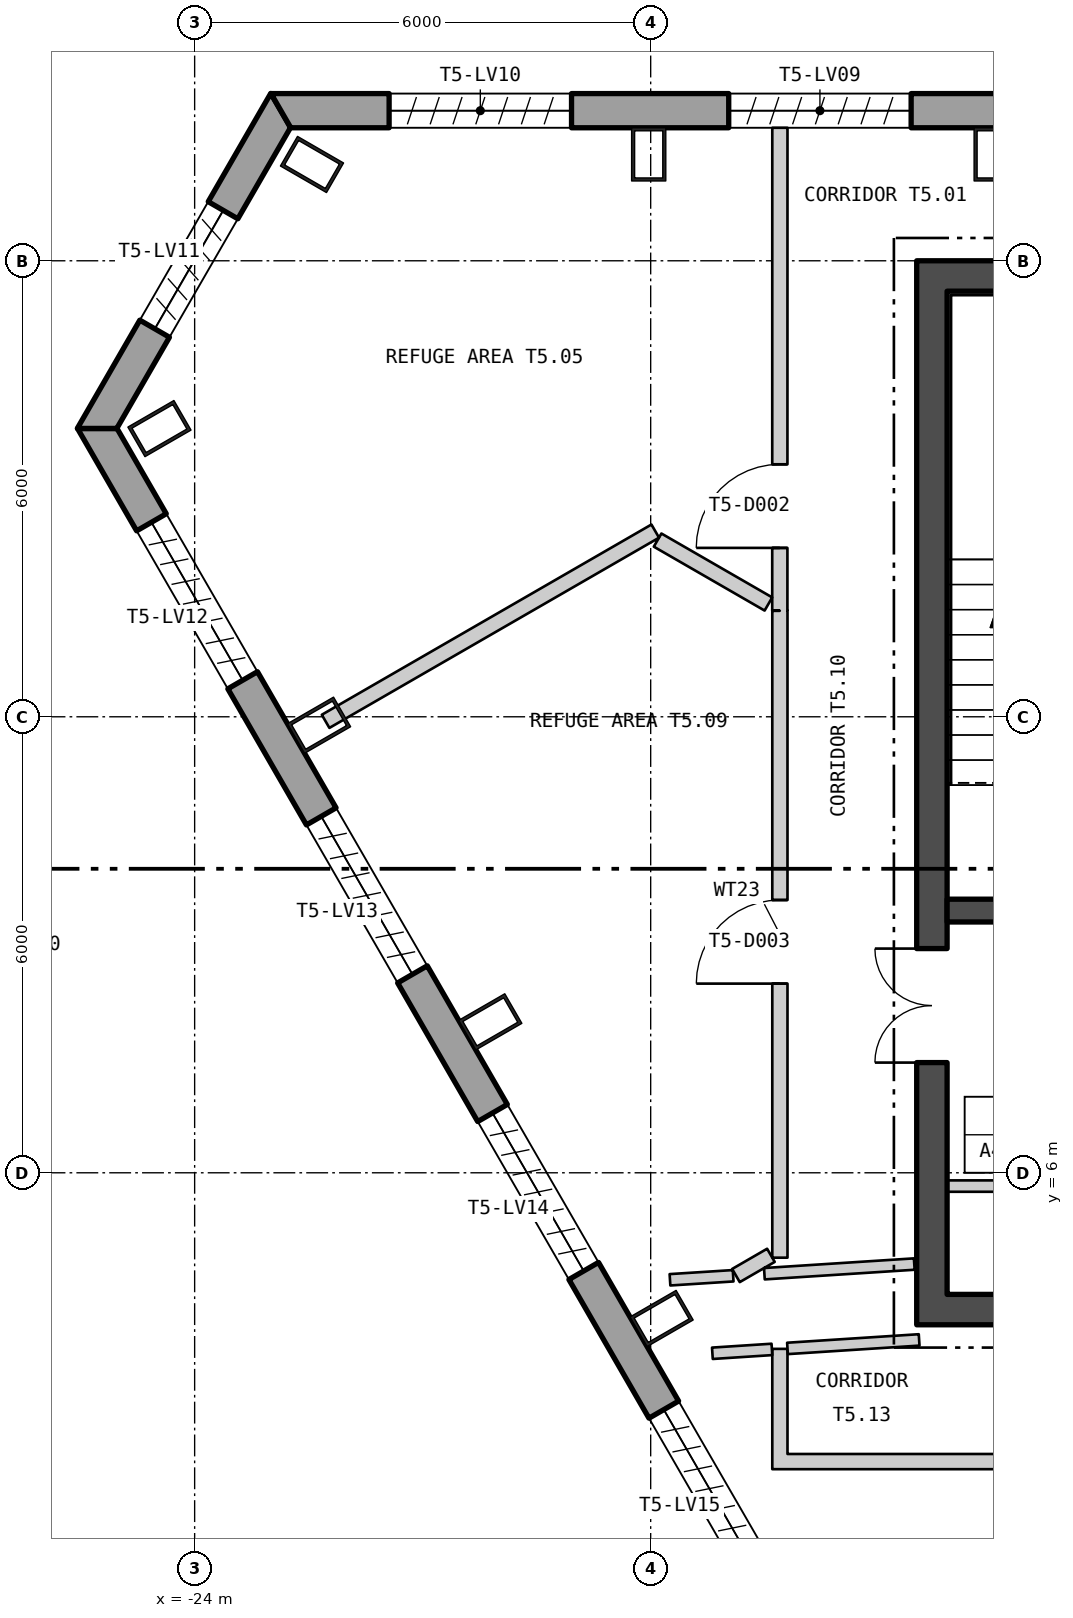
"""IFC4 building model, lengths in metres.
Left out: names, types, materials, properties, quantities, classifications, styles, units other than length and angle.
Written with IfcOpenShell. Run it as: python <this file> out.ifc"""

import sys

from ifc_helpers import new_model, si_unit, direction, frame, frame_2d, origin, origin_2d, place, context, subcontext, project, spatial, polyline, rectangle, hollow_rectangle, outline, extrude, element, fill, save


model = new_model("IFC4")
c1 = context("Model", 3, precision=1e-05, world=origin(), true_north=direction((0.0, 1.0)))
c2 = subcontext(c1, "Body", "Model", "MODEL_VIEW")
j1 = project(units=[si_unit("LENGTHUNIT", "METRE"), si_unit("PLANEANGLEUNIT", "RADIAN")], contexts=[c1])
p1 = place(None, origin())
s1 = spatial("IfcSite", under=j1, at=p1, CompositionType="ELEMENT")
p2 = place(p1, origin())
s2 = spatial("IfcBuilding", under=s1, at=p2, CompositionType="ELEMENT")
p3 = place(p2, frame((0.0, 0.0, 292.2)))
s3 = spatial("IfcBuildingStorey", under=s2, at=p3, CompositionType="ELEMENT", Elevation=292.2)
for number, where, z_axis, x_axis in (
    (1, (-13.52, 19.4, 0.0), (0.0, 0.0, 1.0), (-1.0, 0.0, 0.0)),
    (2, (-18.026, 19.4, 0.0), (0.0, 0.0, 1.0), (-1.0, 0.0, 0.0)),
    (3, (-22.456, 19.267, 0.0), (0.0, 0.0, 1.0), (-0.5, -0.866, 0.0)),
    (4, (-24.463, 15.792, 0.0), (0.0, 0.0, 1.0), (0.5, -0.866, 0.0)),
    (5, (-22.363, 11.889, 0.0), (0.0, 0.0, 1.0), (0.5, -0.866, 0.0)),
    (6, (-20.11, 7.986, 0.0), (0.0, 0.0, 1.0), (0.5, -0.866, 0.0)),
    (7, (-17.856, 4.083, 0.0), (0.0, 0.0, 1.0), (0.5, -0.866, 0.0)),
):
    element("IfcColumn", number, at=place(p3, frame(where, z_axis=z_axis, x_axis=x_axis)), inside=s3, PredefinedType="COLUMN", context=c2, shape_type="SweptSolid", body=[
        extrude(hollow_rectangle(XDim=0.45, YDim=0.7, WallThickness=0.04, at=origin_2d()), origin(), (0.0, 0.0, 1.0), 6.0),
    ])
p4 = place(p3, frame((22.865, 19.975, -0.4), z_axis=(0.0, 0.0, 1.0), x_axis=(-1.0, 0.0, 0.0)))
e8 = element("IfcWall", 8, at=p4, inside=s3, PredefinedType="SOLIDWALL", context=c2, shape_type="SweptSolid", body=[
    extrude(outline(polyline([(-0.13, -0.225), (45.86, -0.225), (45.6, 0.225), (0.13, 0.225), (-0.13, -0.225)])), origin(), (0.0, 0.0, 1.0), 6.0),
])
p5 = place(p4, frame((1.424, 0.0, 1.6)))
e9 = element("IfcOpeningElement", 9, at=p5, cuts=e8, PredefinedType="OPENING", context=c2, shape_type="SweptSolid", body=[
    extrude(rectangle(XDim=2.4, YDim=3.6, at=frame_2d((1.2, 1.8))), frame((0.0, 0.235, 0.0), z_axis=(0.0, -1.0, 0.0), x_axis=(1.0, 0.0, 0.0)), (0.0, 0.0, 1.0), 0.47),
])
p6 = place(p4, frame((5.892, 0.0, 1.6)))
e10 = element("IfcOpeningElement", 10, at=p6, cuts=e8, PredefinedType="OPENING", context=c2, shape_type="SweptSolid", body=[
    extrude(rectangle(XDim=2.4, YDim=3.6, at=frame_2d((1.2, 1.8))), frame((0.0, 0.235, 0.0), z_axis=(0.0, -1.0, 0.0), x_axis=(1.0, 0.0, 0.0)), (0.0, 0.0, 1.0), 0.47),
])
p7 = place(p4, frame((10.399, 0.0, 1.6)))
e11 = element("IfcOpeningElement", 11, at=p7, cuts=e8, PredefinedType="OPENING", context=c2, shape_type="SweptSolid", body=[
    extrude(rectangle(XDim=2.4, YDim=3.6, at=frame_2d((1.2, 1.8))), frame((0.0, 0.235, 0.0), z_axis=(0.0, -1.0, 0.0), x_axis=(1.0, 0.0, 0.0)), (0.0, 0.0, 1.0), 0.47),
])
p8 = place(p4, frame((14.905, 0.0, 1.6)))
e12 = element("IfcOpeningElement", 12, at=p8, cuts=e8, PredefinedType="OPENING", context=c2, shape_type="SweptSolid", body=[
    extrude(rectangle(XDim=2.4, YDim=3.6, at=frame_2d((1.2, 1.8))), frame((0.0, 0.235, 0.0), z_axis=(0.0, -1.0, 0.0), x_axis=(1.0, 0.0, 0.0)), (0.0, 0.0, 1.0), 0.47),
])
p9 = place(p4, frame((19.412, 0.0, 1.6)))
e13 = element("IfcOpeningElement", 13, at=p9, cuts=e8, PredefinedType="OPENING", context=c2, shape_type="SweptSolid", body=[
    extrude(rectangle(XDim=2.4, YDim=3.6, at=frame_2d((1.2, 1.8))), frame((0.0, 0.235, 0.0), z_axis=(0.0, -1.0, 0.0), x_axis=(1.0, 0.0, 0.0)), (0.0, 0.0, 1.0), 0.47),
])
p10 = place(p4, frame((23.918, 0.0, 1.6)))
e14 = element("IfcOpeningElement", 14, at=p10, cuts=e8, PredefinedType="OPENING", context=c2, shape_type="SweptSolid", body=[
    extrude(rectangle(XDim=2.4, YDim=3.6, at=frame_2d((1.2, 1.8))), frame((0.0, 0.235, 0.0), z_axis=(0.0, -1.0, 0.0), x_axis=(1.0, 0.0, 0.0)), (0.0, 0.0, 1.0), 0.47),
])
p11 = place(p4, frame((28.425, 0.0, 1.6)))
e15 = element("IfcOpeningElement", 15, at=p11, cuts=e8, PredefinedType="OPENING", context=c2, shape_type="SweptSolid", body=[
    extrude(rectangle(XDim=2.4, YDim=3.6, at=frame_2d((1.2, 1.8))), frame((0.0, 0.235, 0.0), z_axis=(0.0, -1.0, 0.0), x_axis=(1.0, 0.0, 0.0)), (0.0, 0.0, 1.0), 0.47),
])
p12 = place(p4, frame((32.932, 0.0, 1.6)))
e16 = element("IfcOpeningElement", 16, at=p12, cuts=e8, PredefinedType="OPENING", context=c2, shape_type="SweptSolid", body=[
    extrude(rectangle(XDim=2.4, YDim=3.6, at=frame_2d((1.2, 1.8))), frame((0.0, 0.235, 0.0), z_axis=(0.0, -1.0, 0.0), x_axis=(1.0, 0.0, 0.0)), (0.0, 0.0, 1.0), 0.47),
])
p13 = place(p4, frame((37.438, 0.0, 1.6)))
e17 = element("IfcOpeningElement", 17, at=p13, cuts=e8, PredefinedType="OPENING", context=c2, shape_type="SweptSolid", body=[
    extrude(rectangle(XDim=2.4, YDim=3.6, at=frame_2d((1.2, 1.8))), frame((0.0, 0.235, 0.0), z_axis=(0.0, -1.0, 0.0), x_axis=(1.0, 0.0, 0.0)), (0.0, 0.0, 1.0), 0.47),
])
p14 = place(p4, frame((41.907, 0.0, 1.6)))
e18 = element("IfcOpeningElement", 18, at=p14, cuts=e8, PredefinedType="OPENING", context=c2, shape_type="SweptSolid", body=[
    extrude(rectangle(XDim=2.4, YDim=3.6, at=frame_2d((1.2, 1.8))), frame((0.0, 0.235, 0.0), z_axis=(0.0, -1.0, 0.0), x_axis=(1.0, 0.0, 0.0)), (0.0, 0.0, 1.0), 0.47),
])
p15 = place(p3, frame((-22.869, 19.977, -0.4), z_axis=(0.0, 0.0, 1.0), x_axis=(-0.499997839997, -0.866026650859, 0.0)))
e19 = element("IfcWall", 19, at=p15, inside=s3, PredefinedType="SOLIDWALL", context=c2, shape_type="SweptSolid", body=[
    extrude(outline(polyline([(-0.13, -0.225), (4.96, -0.225), (4.7, 0.225), (0.13, 0.225), (-0.13, -0.225)])), origin(), (0.0, 0.0, 1.0), 6.0),
])
p16 = place(p15, frame((1.515, 0.0, 1.6)))
e20 = element("IfcOpeningElement", 20, at=p16, cuts=e19, PredefinedType="OPENING", context=c2, shape_type="SweptSolid", body=[
    extrude(rectangle(XDim=1.8, YDim=3.6, at=frame_2d((0.9, 1.8))), frame((0.0, 0.235, 0.0), z_axis=(0.0, -1.0, 0.0), x_axis=(1.0, 0.0, 0.0)), (0.0, 0.0, 1.0), 0.47),
])
p17 = place(p3, frame((-25.28, 15.792, -0.18), z_axis=(0.0, 0.0, 1.0), x_axis=(0.500000141277, -0.866025322218, 0.0)))
e21 = element("IfcWall", 21, at=p17, inside=s3, PredefinedType="SOLIDWALL", context=c2, shape_type="SweptSolid", body=[
    extrude(outline(polyline([(-0.13, -0.225), (45.86, -0.225), (45.6, 0.225), (0.13, 0.225), (-0.13, -0.225)])), origin(), (0.0, 0.0, 1.0), 5.9),
])
p18 = place(p17, frame((1.424, 0.0, 1.38)))
e22 = element("IfcOpeningElement", 22, at=p18, cuts=e21, PredefinedType="OPENING", context=c2, shape_type="SweptSolid", body=[
    extrude(rectangle(XDim=2.4, YDim=3.6, at=frame_2d((1.2, 1.8))), frame((0.0, 0.235, 0.0), z_axis=(0.0, -1.0, 0.0), x_axis=(1.0, 0.0, 0.0)), (0.0, 0.0, 1.0), 0.47),
])
p19 = place(p17, frame((5.892, 0.0, 1.38)))
e23 = element("IfcOpeningElement", 23, at=p19, cuts=e21, PredefinedType="OPENING", context=c2, shape_type="SweptSolid", body=[
    extrude(rectangle(XDim=2.4, YDim=3.6, at=frame_2d((1.2, 1.8))), frame((0.0, 0.235, 0.0), z_axis=(0.0, -1.0, 0.0), x_axis=(1.0, 0.0, 0.0)), (0.0, 0.0, 1.0), 0.47),
])
p20 = place(p17, frame((10.399, 0.0, 1.38)))
e24 = element("IfcOpeningElement", 24, at=p20, cuts=e21, PredefinedType="OPENING", context=c2, shape_type="SweptSolid", body=[
    extrude(rectangle(XDim=2.4, YDim=3.6, at=frame_2d((1.2, 1.8))), frame((0.0, 0.235, 0.0), z_axis=(0.0, -1.0, 0.0), x_axis=(1.0, 0.0, 0.0)), (0.0, 0.0, 1.0), 0.47),
])
p21 = place(p17, frame((14.905, 0.0, 1.38)))
e25 = element("IfcOpeningElement", 25, at=p21, cuts=e21, PredefinedType="OPENING", context=c2, shape_type="SweptSolid", body=[
    extrude(rectangle(XDim=2.4, YDim=3.6, at=frame_2d((1.2, 1.8))), frame((0.0, 0.235, 0.0), z_axis=(0.0, -1.0, 0.0), x_axis=(1.0, 0.0, 0.0)), (0.0, 0.0, 1.0), 0.47),
])
p22 = place(p17, frame((19.412, 0.0, 1.38)))
e26 = element("IfcOpeningElement", 26, at=p22, cuts=e21, PredefinedType="OPENING", context=c2, shape_type="SweptSolid", body=[
    extrude(rectangle(XDim=2.4, YDim=3.6, at=frame_2d((1.2, 1.8))), frame((0.0, 0.235, 0.0), z_axis=(0.0, -1.0, 0.0), x_axis=(1.0, 0.0, 0.0)), (0.0, 0.0, 1.0), 0.47),
])
p23 = place(p17, frame((23.918, 0.0, 1.38)))
e27 = element("IfcOpeningElement", 27, at=p23, cuts=e21, PredefinedType="OPENING", context=c2, shape_type="SweptSolid", body=[
    extrude(rectangle(XDim=2.4, YDim=3.6, at=frame_2d((1.2, 1.8))), frame((0.0, 0.235, 0.0), z_axis=(0.0, -1.0, 0.0), x_axis=(1.0, 0.0, 0.0)), (0.0, 0.0, 1.0), 0.47),
])
p24 = place(p17, frame((28.425, 0.0, 1.38)))
e28 = element("IfcOpeningElement", 28, at=p24, cuts=e21, PredefinedType="OPENING", context=c2, shape_type="SweptSolid", body=[
    extrude(rectangle(XDim=2.4, YDim=3.6, at=frame_2d((1.2, 1.8))), frame((0.0, 0.235, 0.0), z_axis=(0.0, -1.0, 0.0), x_axis=(1.0, 0.0, 0.0)), (0.0, 0.0, 1.0), 0.47),
])
p25 = place(p17, frame((32.932, 0.0, 1.38)))
e29 = element("IfcOpeningElement", 29, at=p25, cuts=e21, PredefinedType="OPENING", context=c2, shape_type="SweptSolid", body=[
    extrude(rectangle(XDim=2.4, YDim=3.6, at=frame_2d((1.2, 1.8))), frame((0.0, 0.235, 0.0), z_axis=(0.0, -1.0, 0.0), x_axis=(1.0, 0.0, 0.0)), (0.0, 0.0, 1.0), 0.47),
])
p26 = place(p17, frame((37.438, 0.0, 1.38)))
e30 = element("IfcOpeningElement", 30, at=p26, cuts=e21, PredefinedType="OPENING", context=c2, shape_type="SweptSolid", body=[
    extrude(rectangle(XDim=2.4, YDim=3.6, at=frame_2d((1.2, 1.8))), frame((0.0, 0.235, 0.0), z_axis=(0.0, -1.0, 0.0), x_axis=(1.0, 0.0, 0.0)), (0.0, 0.0, 1.0), 0.47),
])
p27 = place(p17, frame((41.907, 0.0, 1.38)))
e31 = element("IfcOpeningElement", 31, at=p27, cuts=e21, PredefinedType="OPENING", context=c2, shape_type="SweptSolid", body=[
    extrude(rectangle(XDim=2.4, YDim=3.6, at=frame_2d((1.2, 1.8))), frame((0.0, 0.235, 0.0), z_axis=(0.0, -1.0, 0.0), x_axis=(1.0, 0.0, 0.0)), (0.0, 0.0, 1.0), 0.47),
])
p28 = place(p3, frame((-14.5, 4.2, 0.0), z_axis=(0.0, 0.0, 1.0), x_axis=(1.0, 0.0, 0.0)))
e32 = element("IfcWall", 32, at=p28, inside=s3, PredefinedType="SHEAR", context=c2, shape_type="SweptSolid", body=[
    extrude(rectangle(XDim=29.0, YDim=0.4, at=frame_2d((14.5, 0.0))), origin(), (0.0, 0.0, 1.0), 5.7),
])
p29 = place(p28, frame((9.0, 0.0, 0.0)))
e33 = element("IfcOpeningElement", 33, at=p29, cuts=e32, PredefinedType="OPENING", context=c2, shape_type="SweptSolid", body=[
    extrude(rectangle(XDim=1.8, YDim=2.4, at=frame_2d((0.9, 1.2))), frame((0.0, 0.21, 0.0), z_axis=(0.0, -1.0, 0.0), x_axis=(1.0, 0.0, 0.0)), (0.0, 0.0, 1.0), 0.42),
])
p30 = place(p28, frame((19.0, 0.0, 0.0)))
e34 = element("IfcOpeningElement", 34, at=p30, cuts=e32, PredefinedType="OPENING", context=c2, shape_type="SweptSolid", body=[
    extrude(rectangle(XDim=1.8, YDim=2.4, at=frame_2d((0.9, 1.2))), frame((0.0, 0.21, 0.0), z_axis=(0.0, -1.0, 0.0), x_axis=(1.0, 0.0, 0.0)), (0.0, 0.0, 1.0), 0.42),
])
p31 = place(p3, frame((-14.5, 17.8, 0.0), z_axis=(0.0, 0.0, 1.0), x_axis=(1.0, 0.0, 0.0)))
e35 = element("IfcWall", 35, at=p31, inside=s3, PredefinedType="SHEAR", context=c2, shape_type="SweptSolid", body=[
    extrude(rectangle(XDim=29.0, YDim=0.4, at=frame_2d((14.5, 0.0))), origin(), (0.0, 0.0, 1.0), 5.7),
])
p32 = place(p3, frame((-14.3, 4.4, 0.0), z_axis=(0.0, 0.0, 1.0), x_axis=(0.0, 1.0, 0.0)))
e36 = element("IfcWall", 36, at=p32, inside=s3, PredefinedType="SHEAR", context=c2, shape_type="SweptSolid", body=[
    extrude(rectangle(XDim=13.2, YDim=0.4, at=frame_2d((6.6, 0.0))), origin(), (0.0, 0.0, 1.0), 5.7),
])
p33 = place(p32, frame((3.05, 0.0, 0.0)))
e37 = element("IfcOpeningElement", 37, at=p33, cuts=e36, PredefinedType="OPENING", context=c2, shape_type="SweptSolid", body=[
    extrude(rectangle(XDim=1.5, YDim=2.1, at=frame_2d((0.75, 1.05))), frame((0.0, 0.21, 0.0), z_axis=(0.0, -1.0, 0.0), x_axis=(1.0, 0.0, 0.0)), (0.0, 0.0, 1.0), 0.42),
])
p34 = place(p3, frame((-14.1, 9.45, 0.0), z_axis=(0.0, 0.0, 1.0), x_axis=(1.0, 0.0, 0.0)))
e38 = element("IfcWall", 38, at=p34, inside=s3, PredefinedType="SHEAR", context=c2, shape_type="SweptSolid", body=[
    extrude(rectangle(XDim=3.1, YDim=0.3, at=frame_2d((1.55, 0.0))), origin(), (0.0, 0.0, 1.0), 5.7),
])
p35 = place(p34, frame((0.95, 0.0, 0.0)))
e39 = element("IfcOpeningElement", 39, at=p35, cuts=e38, PredefinedType="OPENING", context=c2, shape_type="SweptSolid", body=[
    extrude(rectangle(XDim=1.2, YDim=2.1, at=frame_2d((0.6, 1.05))), frame((0.0, 0.16, 0.0), z_axis=(0.0, -1.0, 0.0), x_axis=(1.0, 0.0, 0.0)), (0.0, 0.0, 1.0), 0.32),
])
p36 = place(p3, frame((-14.1, 5.825, 0.0), z_axis=(0.0, 0.0, 1.0), x_axis=(1.0, 0.0, 0.0)))
e40 = element("IfcWall", 40, at=p36, inside=s3, PredefinedType="PARTITIONING", context=c2, shape_type="SweptSolid", body=[
    extrude(rectangle(XDim=3.1, YDim=0.15, at=frame_2d((1.55, 0.0))), origin(), (0.0, 0.0, 1.0), 5.7),
])
p37 = place(p3, frame((-22.277, 11.94, 0.0), z_axis=(0.0, 0.0, 1.0), x_axis=(0.866109108303, 0.499854991488, 0.0)))
e41 = element("IfcWall", 41, at=p37, inside=s3, PredefinedType="PARTITIONING", context=c2, shape_type="SweptSolid", body=[
    extrude(rectangle(XDim=5.008, YDim=0.2, at=frame_2d((2.504, 0.0))), origin(), (0.0, 0.0, 1.0), 5.7),
])
p38 = place(p3, frame((-17.909, 14.325, 0.0), z_axis=(0.0, 0.0, 1.0), x_axis=(0.866225147291, -0.499653874398, 0.0)))
e42 = element("IfcWall", 42, at=p38, inside=s3, PredefinedType="PARTITIONING", context=c2, shape_type="SweptSolid", body=[
    extrude(rectangle(XDim=1.683, YDim=0.2, at=frame_2d((0.842, 0.0))), origin(), (0.0, 0.0, 1.0), 5.7),
])
p39 = place(p3, frame((-17.746, 4.592, 0.0), z_axis=(0.0, 0.0, 1.0), x_axis=(0.997972330248, 0.063649258127, 0.0)))
e43 = element("IfcWall", 43, at=p39, inside=s3, PredefinedType="PARTITIONING", context=c2, shape_type="SweptSolid", body=[
    extrude(rectangle(XDim=0.833, YDim=0.15, at=frame_2d((0.416, 0.0))), origin(), (0.0, 0.0, 1.0), 5.7),
])
p40 = place(p3, frame((-17.188, 3.625, 0.0), z_axis=(0.0, 0.0, 1.0), x_axis=(0.997885500156, 0.064996373573, 0.0)))
e44 = element("IfcWall", 44, at=p40, inside=s3, PredefinedType="PARTITIONING", context=c2, shape_type="SweptSolid", body=[
    extrude(rectangle(XDim=0.785, YDim=0.15, at=frame_2d((0.392, 0.0))), origin(), (0.0, 0.0, 1.0), 5.7),
])
p41 = place(p3, frame((-16.878, 4.648, 0.0), z_axis=(0.0, 0.0, 1.0), x_axis=(0.865683861507, 0.500591102524, 0.0)))
e45 = element("IfcWall", 45, at=p41, inside=s3, PredefinedType="PARTITIONING", context=c2, shape_type="SweptSolid", body=[
    extrude(rectangle(XDim=0.531, YDim=0.2, at=frame_2d((0.266, 0.0))), origin(), (0.0, 0.0, 1.0), 5.7),
])
p42 = place(p3, frame((-16.504, 4.672, 0.0), z_axis=(0.0, 0.0, 1.0), x_axis=(0.997932644153, 0.064268481647, 0.0)))
e46 = element("IfcWall", 46, at=p42, inside=s3, PredefinedType="PARTITIONING", context=c2, shape_type="SweptSolid", body=[
    extrude(rectangle(XDim=1.976, YDim=0.15, at=frame_2d((0.988, 0.0))), origin(), (0.0, 0.0, 1.0), 5.7),
])
p43 = place(p3, frame((-16.4, 2.2, 0.0), z_axis=(0.0, 0.0, 1.0), x_axis=(1.0, 0.0, 0.0)))
e47 = element("IfcWall", 47, at=p43, inside=s3, PredefinedType="PARTITIONING", context=c2, shape_type="SweptSolid", body=[
    extrude(rectangle(XDim=8.73, YDim=0.2, at=frame_2d((4.365, 0.0))), origin(), (0.0, 0.0, 1.0), 5.7),
])
p44 = place(p43, frame((4.657, 0.0, 0.0)))
e48 = element("IfcOpeningElement", 48, at=p44, cuts=e47, PredefinedType="OPENING", context=c2, shape_type="SweptSolid", body=[
    extrude(rectangle(XDim=1.1, YDim=2.1, at=frame_2d((0.55, 1.05))), frame((0.0, 0.11, 0.0), z_axis=(0.0, -1.0, 0.0), x_axis=(1.0, 0.0, 0.0)), (0.0, 0.0, 1.0), 0.22),
])
p45 = place(p3, frame((-16.301, 13.395, 0.0), z_axis=(0.0, 0.0, 1.0), x_axis=(0.00015735641, 0.999999987619, 0.0)))
e49 = element("IfcWall", 49, at=p45, inside=s3, PredefinedType="PARTITIONING", context=c2, shape_type="SweptSolid", body=[
    extrude(rectangle(XDim=6.355, YDim=0.2, at=frame_2d((3.178, 0.0))), origin(), (0.0, 0.0, 1.0), 5.7),
])
p46 = place(p45, frame((0.827, 0.0, 0.0)))
e50 = element("IfcOpeningElement", 50, at=p46, cuts=e49, PredefinedType="OPENING", context=c2, shape_type="SweptSolid", body=[
    extrude(rectangle(XDim=1.1, YDim=2.1, at=frame_2d((0.55, 1.05))), frame((0.0, 0.11, 0.0), z_axis=(0.0, -1.0, 0.0), x_axis=(1.0, 0.0, 0.0)), (0.0, 0.0, 1.0), 0.22),
])
p47 = place(p3, frame((-16.3, 2.3, 0.0), z_axis=(0.0, 0.0, 1.0), x_axis=(0.0, 1.0, 0.0)))
e51 = element("IfcWall", 51, at=p47, inside=s3, PredefinedType="PARTITIONING", context=c2, shape_type="SweptSolid", body=[
    extrude(rectangle(XDim=1.383, YDim=0.2, at=frame_2d((0.692, 0.0))), origin(), (0.0, 0.0, 1.0), 5.7),
])
p48 = place(p3, frame((-16.3, 4.883, 0.0), z_axis=(0.0, 0.0, 1.0), x_axis=(0.0, 1.0, 0.0)))
e52 = element("IfcWall", 52, at=p48, inside=s3, PredefinedType="PARTITIONING", context=c2, shape_type="SweptSolid", body=[
    extrude(rectangle(XDim=8.512, YDim=0.2, at=frame_2d((4.256, 0.0))), origin(), (0.0, 0.0, 1.0), 5.7),
])
p49 = place(p48, frame((3.606, 0.0, 0.0)))
e53 = element("IfcOpeningElement", 53, at=p49, cuts=e52, PredefinedType="OPENING", context=c2, shape_type="SweptSolid", body=[
    extrude(rectangle(XDim=1.1, YDim=2.1, at=frame_2d((0.55, 1.05))), frame((0.0, 0.11, 0.0), z_axis=(0.0, -1.0, 0.0), x_axis=(1.0, 0.0, 0.0)), (0.0, 0.0, 1.0), 0.22),
])
p50 = place(p3, frame((-16.2, 3.689, 0.0), z_axis=(0.0, 0.0, 1.0), x_axis=(0.997915745008, 0.064530348407, 0.0)))
e54 = element("IfcWall", 54, at=p50, inside=s3, PredefinedType="PARTITIONING", context=c2, shape_type="SweptSolid", body=[
    extrude(rectangle(XDim=1.736, YDim=0.15, at=frame_2d((0.868, 0.0))), origin(), (0.0, 0.0, 1.0), 5.7),
])
p51 = place(p33, origin())
e55 = element("IfcDoor", 55, at=p51, inside=s3, OperationType="DOUBLE_DOOR_SINGLE_SWING", PredefinedType="DOOR", context=c2, shape_type="SweptSolid", body=[
    extrude(rectangle(XDim=1.5, YDim=2.1, at=frame_2d((0.75, 1.05))), frame((0.0, 0.025, 0.0), z_axis=(0.0, -1.0, 0.0), x_axis=(1.0, 0.0, 0.0)), (0.0, 0.0, 1.0), 0.05),
])
fill(e37, e55)
p52 = place(p46, origin())
e56 = element("IfcDoor", 56, at=p52, inside=s3, OperationType="SINGLE_SWING_RIGHT", PredefinedType="DOOR", context=c2, shape_type="SweptSolid", body=[
    extrude(rectangle(XDim=1.1, YDim=2.1, at=frame_2d((0.55, 1.05))), frame((0.0, 0.025, 0.0), z_axis=(0.0, -1.0, 0.0), x_axis=(1.0, 0.0, 0.0)), (0.0, 0.0, 1.0), 0.05),
])
fill(e50, e56)
p53 = place(p49, origin())
e57 = element("IfcDoor", 57, at=p53, inside=s3, OperationType="SINGLE_SWING_RIGHT", PredefinedType="DOOR", context=c2, shape_type="SweptSolid", body=[
    extrude(rectangle(XDim=1.1, YDim=2.1, at=frame_2d((0.55, 1.05))), frame((0.0, 0.025, 0.0), z_axis=(0.0, -1.0, 0.0), x_axis=(1.0, 0.0, 0.0)), (0.0, 0.0, 1.0), 0.05),
])
fill(e53, e57)
save(model, sys.argv[1])
